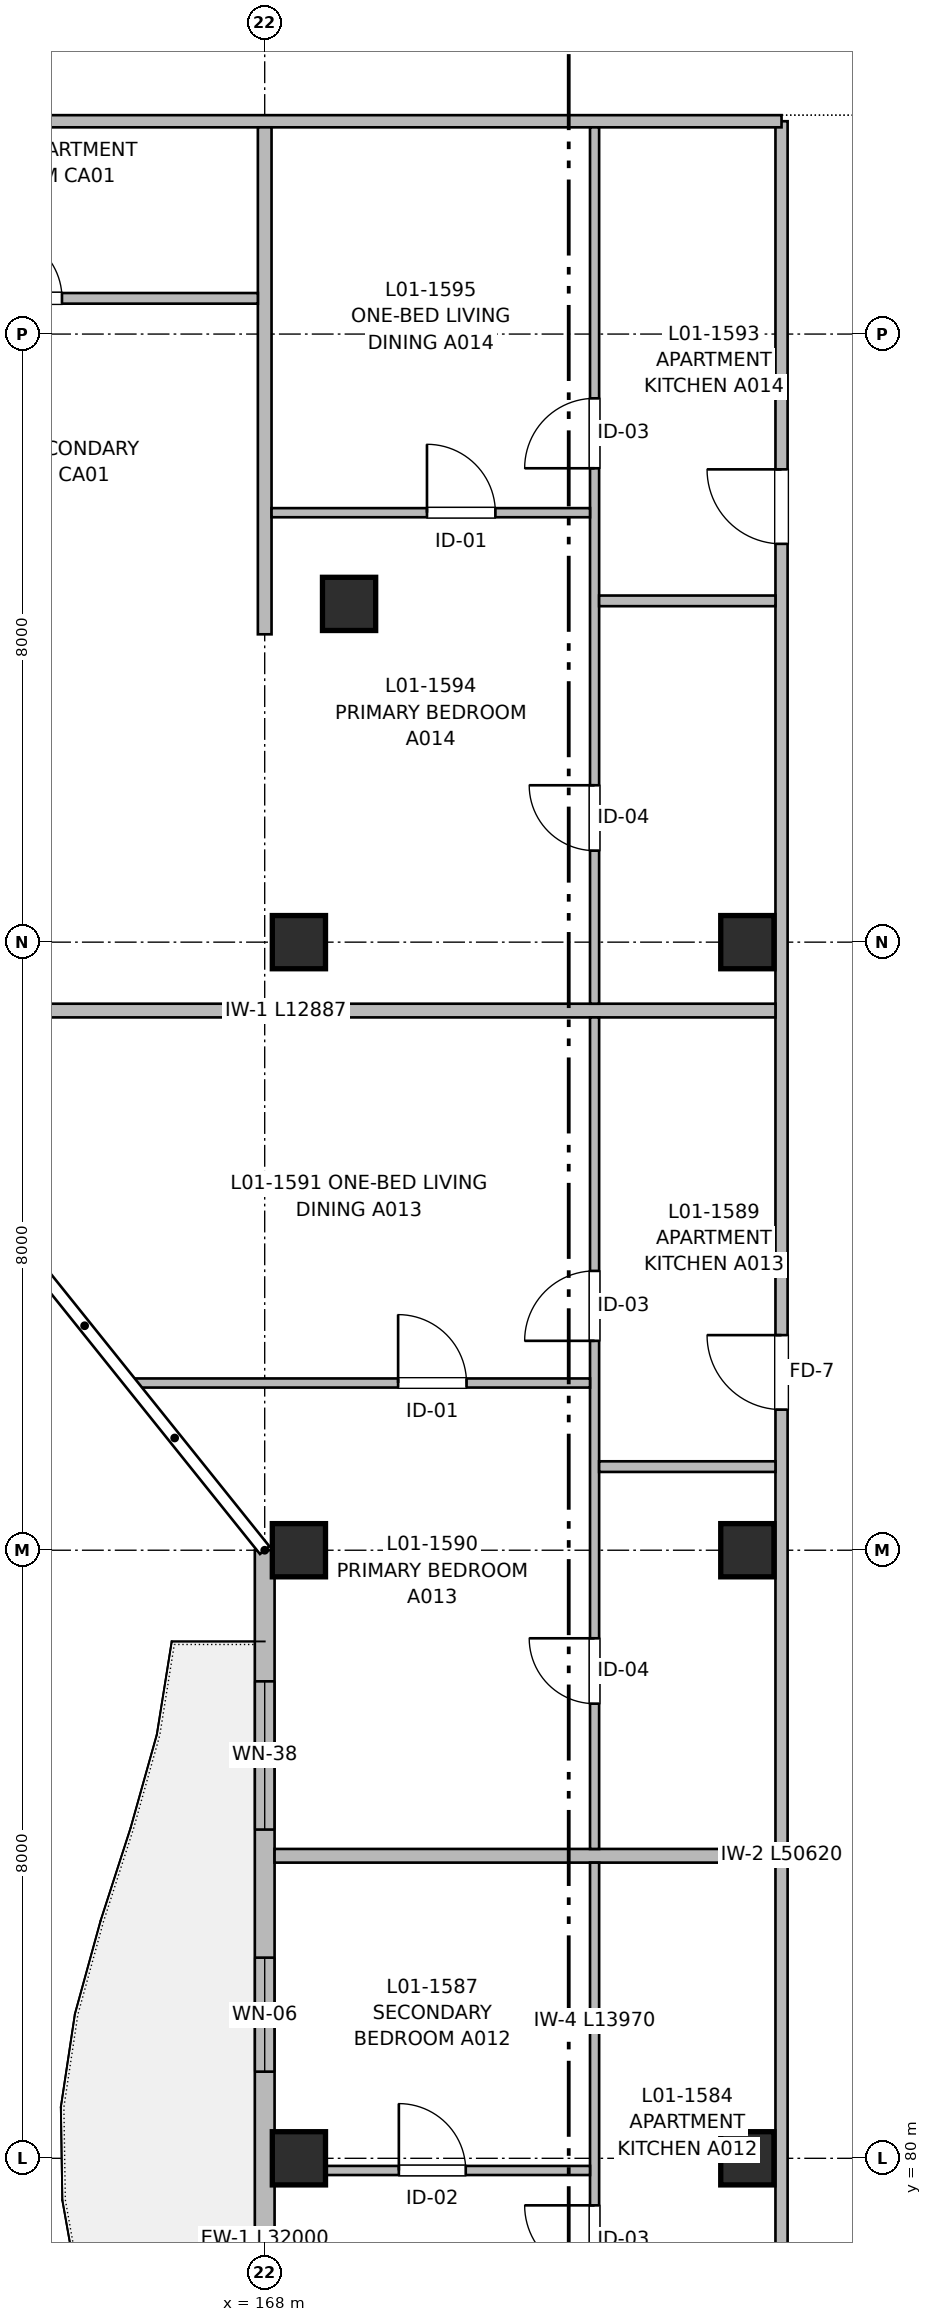
"""IFC4 building model, lengths in metres.
Left out: names, types, materials, properties, quantities, classifications, styles, units other than length and angle.
Written with IfcOpenShell. Run it as: python <this file> out.ifc"""

import sys

from ifc_helpers import new_model, si_unit, direction, frame, frame_2d, origin, origin_2d, place, context, subcontext, project, spatial, rectangle, extrude, element, fill, save


model = new_model("IFC4")
c1 = context("Model", 3, precision=1e-05, world=origin(), true_north=direction((0.0, 1.0)))
c2 = subcontext(c1, "Body", "Model", "MODEL_VIEW")
j1 = project(units=[si_unit("LENGTHUNIT", "METRE"), si_unit("PLANEANGLEUNIT", "RADIAN")], contexts=[c1])
p1 = place(None, origin())
s1 = spatial("IfcSite", under=j1, at=p1, CompositionType="ELEMENT")
p2 = place(p1, origin())
s2 = spatial("IfcBuilding", under=s1, at=p2, CompositionType="ELEMENT")
p3 = place(p2, frame((0.0, 0.0, 4.16)))
s3 = spatial("IfcBuildingStorey", under=s2, at=p3, CompositionType="ELEMENT", Elevation=4.16)
for number, where, z_axis, x_axis in (
    (1, (168.45, 80.0, 0.0), (0.0, 0.0, 1.0), (1.0, 0.0, 0.0)),
    (2, (168.45, 88.0, 0.0), (0.0, 0.0, 1.0), (1.0, 0.0, 0.0)),
    (3, (168.45, 96.0, 0.0), (0.0, 0.0, 1.0), (1.0, 0.0, 0.0)),
    (4, (169.11, 100.45, 0.0), (0.0, 0.0, 1.0), (1.0, 0.0, 0.0)),
    (5, (174.35, 80.0, 0.0), (0.0, 0.0, 1.0), (1.0, 0.0, 0.0)),
    (6, (174.35, 88.0, 0.0), (0.0, 0.0, 1.0), (1.0, 0.0, 0.0)),
    (7, (174.35, 96.0, 0.0), (0.0, 0.0, 1.0), (1.0, 0.0, 0.0)),
):
    element("IfcColumn", number, at=place(p3, frame(where, z_axis=z_axis, x_axis=x_axis)), inside=s3, PredefinedType="COLUMN", context=c2, shape_type="SweptSolid", body=[
        extrude(rectangle(XDim=0.7, YDim=0.7, at=origin_2d()), origin(), (0.0, 0.0, 1.0), 3.2),
    ])
p4 = place(p3, frame((168.0, 56.0, 0.0), z_axis=(0.0, 0.0, 1.0), x_axis=(0.0, 1.0, 0.0)))
e8 = element("IfcWall", 8, at=p4, inside=s3, PredefinedType="SOLIDWALL", context=c2, shape_type="SweptSolid", body=[
    extrude(rectangle(XDim=32.0, YDim=0.26, at=frame_2d((16.0, 0.0))), origin(), (0.0, 0.0, 1.0), 2.98),
])
p5 = place(p4, frame((2.55, 0.0, 0.0)))
e9 = element("IfcOpeningElement", 9, at=p5, cuts=e8, PredefinedType="OPENING", context=c2, shape_type="SweptSolid", body=[
    extrude(rectangle(XDim=1.2, YDim=2.2, at=frame_2d((0.6, 1.1))), frame((0.0, 0.14, 0.0), z_axis=(0.0, -1.0, 0.0), x_axis=(1.0, 0.0, 0.0)), (0.0, 0.0, 1.0), 0.28),
])
p6 = place(p4, frame((5.3, 0.0, 0.72)))
e10 = element("IfcOpeningElement", 10, at=p6, cuts=e8, PredefinedType="OPENING", context=c2, shape_type="SweptSolid", body=[
    extrude(rectangle(XDim=2.0, YDim=1.5, at=frame_2d((1.0, 0.75))), frame((0.0, 0.14, 0.0), z_axis=(0.0, -1.0, 0.0), x_axis=(1.0, 0.0, 0.0)), (0.0, 0.0, 1.0), 0.28),
])
p7 = place(p4, frame((10.85, 0.0, 0.57)))
e11 = element("IfcOpeningElement", 11, at=p7, cuts=e8, PredefinedType="OPENING", context=c2, shape_type="SweptSolid", body=[
    extrude(rectangle(XDim=2.3, YDim=1.65, at=frame_2d((1.15, 0.825))), frame((0.0, 0.14, 0.0), z_axis=(0.0, -1.0, 0.0), x_axis=(1.0, 0.0, 0.0)), (0.0, 0.0, 1.0), 0.28),
])
p8 = place(p4, frame((19.275, 0.0, 0.77)))
e12 = element("IfcOpeningElement", 12, at=p8, cuts=e8, PredefinedType="OPENING", context=c2, shape_type="SweptSolid", body=[
    extrude(rectangle(XDim=1.45, YDim=1.45, at=frame_2d((0.725, 0.725))), frame((0.0, 0.14, 0.0), z_axis=(0.0, -1.0, 0.0), x_axis=(1.0, 0.0, 0.0)), (0.0, 0.0, 1.0), 0.28),
])
p9 = place(p4, frame((28.325, 0.0, 0.72)))
e13 = element("IfcOpeningElement", 13, at=p9, cuts=e8, PredefinedType="OPENING", context=c2, shape_type="SweptSolid", body=[
    extrude(rectangle(XDim=1.95, YDim=1.5, at=frame_2d((0.975, 0.75))), frame((0.0, 0.14, 0.0), z_axis=(0.0, -1.0, 0.0), x_axis=(1.0, 0.0, 0.0)), (0.0, 0.0, 1.0), 0.28),
])
p10 = place(p4, frame((16.479, 0.0, 0.82)))
e14 = element("IfcOpeningElement", 14, at=p10, cuts=e8, PredefinedType="OPENING", context=c2, shape_type="SweptSolid", body=[
    extrude(rectangle(XDim=1.5, YDim=1.4, at=frame_2d((0.75, 0.7))), frame((0.0, 0.14, 0.0), z_axis=(0.0, -1.0, 0.0), x_axis=(1.0, 0.0, 0.0)), (0.0, 0.0, 1.0), 0.28),
])
p11 = place(p4, frame((25.14, 0.0, 0.82)))
e15 = element("IfcOpeningElement", 15, at=p11, cuts=e8, PredefinedType="OPENING", context=c2, shape_type="SweptSolid", body=[
    extrude(rectangle(XDim=1.5, YDim=1.4, at=frame_2d((0.75, 0.7))), frame((0.0, 0.14, 0.0), z_axis=(0.0, -1.0, 0.0), x_axis=(1.0, 0.0, 0.0)), (0.0, 0.0, 1.0), 0.28),
])
p12 = place(p3, frame((174.8, 56.18, 0.0), z_axis=(0.0, 0.0, 1.0), x_axis=(0.0, 1.0, 0.0)))
e16 = element("IfcWall", 16, at=p12, inside=s3, PredefinedType="PARTITIONING", context=c2, shape_type="SweptSolid", body=[
    extrude(rectangle(XDim=50.62, YDim=0.16, at=frame_2d((25.31, 0.0))), origin(), (0.0, 0.0, 1.0), 2.935),
])
p13 = place(p12, frame((8.79, 0.0, 0.0)))
e17 = element("IfcOpeningElement", 17, at=p13, cuts=e16, PredefinedType="OPENING", context=c2, shape_type="SweptSolid", body=[
    extrude(rectangle(XDim=0.98, YDim=2.15, at=frame_2d((0.49, 1.075))), frame((0.0, 0.09, 0.0), z_axis=(0.0, -1.0, 0.0), x_axis=(1.0, 0.0, 0.0)), (0.0, 0.0, 1.0), 0.18),
])
p14 = place(p12, frame((20.92, 0.0, 0.0)))
e18 = element("IfcOpeningElement", 18, at=p14, cuts=e16, PredefinedType="OPENING", context=c2, shape_type="SweptSolid", body=[
    extrude(rectangle(XDim=1.02, YDim=2.15, at=frame_2d((0.51, 1.075))), frame((0.0, 0.09, 0.0), z_axis=(0.0, -1.0, 0.0), x_axis=(1.0, 0.0, 0.0)), (0.0, 0.0, 1.0), 0.18),
])
p15 = place(p12, frame((33.67, 0.0, 0.0)))
e19 = element("IfcOpeningElement", 19, at=p15, cuts=e16, PredefinedType="OPENING", context=c2, shape_type="SweptSolid", body=[
    extrude(rectangle(XDim=0.98, YDim=2.15, at=frame_2d((0.49, 1.075))), frame((0.0, 0.09, 0.0), z_axis=(0.0, -1.0, 0.0), x_axis=(1.0, 0.0, 0.0)), (0.0, 0.0, 1.0), 0.18),
])
p16 = place(p12, frame((45.06, 0.0, 0.0)))
e20 = element("IfcOpeningElement", 20, at=p16, cuts=e16, PredefinedType="OPENING", context=c2, shape_type="SweptSolid", body=[
    extrude(rectangle(XDim=0.98, YDim=2.15, at=frame_2d((0.49, 1.075))), frame((0.0, 0.09, 0.0), z_axis=(0.0, -1.0, 0.0), x_axis=(1.0, 0.0, 0.0)), (0.0, 0.0, 1.0), 0.18),
])
p17 = place(p3, frame((147.18, 106.8, 0.0), z_axis=(0.0, 0.0, 1.0), x_axis=(1.0, 0.0, 0.0)))
e21 = element("IfcWall", 21, at=p17, inside=s3, PredefinedType="PARTITIONING", context=c2, shape_type="SweptSolid", body=[
    extrude(rectangle(XDim=27.62, YDim=0.16, at=frame_2d((13.81, 0.0))), origin(), (0.0, 0.0, 1.0), 2.935),
])
p18 = place(p17, frame((3.495, 0.0, 0.0)))
e22 = element("IfcOpeningElement", 22, at=p18, cuts=e21, PredefinedType="OPENING", context=c2, shape_type="SweptSolid", body=[
    extrude(rectangle(XDim=1.05, YDim=2.15, at=frame_2d((0.525, 1.075))), frame((0.0, 0.09, 0.0), z_axis=(0.0, -1.0, 0.0), x_axis=(1.0, 0.0, 0.0)), (0.0, 0.0, 1.0), 0.18),
])
p19 = place(p17, frame((10.67, 0.0, 0.0)))
e23 = element("IfcOpeningElement", 23, at=p19, cuts=e21, PredefinedType="OPENING", context=c2, shape_type="SweptSolid", body=[
    extrude(rectangle(XDim=0.98, YDim=2.15, at=frame_2d((0.49, 1.075))), frame((0.0, 0.09, 0.0), z_axis=(0.0, -1.0, 0.0), x_axis=(1.0, 0.0, 0.0)), (0.0, 0.0, 1.0), 0.18),
])
p20 = place(p3, frame((168.0, 100.05, 0.0), z_axis=(0.0, 0.0, 1.0), x_axis=(0.0, 1.0, 0.0)))
e24 = element("IfcWall", 24, at=p20, inside=s3, PredefinedType="PARTITIONING", context=c2, shape_type="SweptSolid", body=[
    extrude(rectangle(XDim=6.67, YDim=0.18, at=frame_2d((3.335, 0.0))), origin(), (0.0, 0.0, 1.0), 2.935),
])
p21 = place(p3, frame((168.13, 83.98, 0.0), z_axis=(0.0, 0.0, 1.0), x_axis=(1.0, 0.0, 0.0)))
e25 = element("IfcWall", 25, at=p21, inside=s3, PredefinedType="PARTITIONING", context=c2, shape_type="SweptSolid", body=[
    extrude(rectangle(XDim=6.59, YDim=0.18, at=frame_2d((3.295, 0.0))), origin(), (0.0, 0.0, 1.0), 2.935),
])
p22 = place(p3, frame((161.833, 95.1, 0.0), z_axis=(0.0, 0.0, 1.0), x_axis=(1.0, 0.0, 0.0)))
e26 = element("IfcWall", 26, at=p22, inside=s3, PredefinedType="PARTITIONING", context=c2, shape_type="SweptSolid", body=[
    extrude(rectangle(XDim=12.887, YDim=0.18, at=frame_2d((6.444, 0.0))), origin(), (0.0, 0.0, 1.0), 2.935),
])
p23 = place(p3, frame((172.34, 69.92, 0.0), z_axis=(0.0, 0.0, 1.0), x_axis=(0.0, 1.0, 0.0)))
e27 = element("IfcWall", 27, at=p23, inside=s3, PredefinedType="PARTITIONING", context=c2, shape_type="SweptSolid", body=[
    extrude(rectangle(XDim=13.97, YDim=0.12, at=frame_2d((6.985, 0.0))), origin(), (0.0, 0.0, 1.0), 2.935),
])
p24 = place(p23, frame((2.443, 0.0, 0.0)))
e28 = element("IfcOpeningElement", 28, at=p24, cuts=e27, PredefinedType="OPENING", context=c2, shape_type="SweptSolid", body=[
    extrude(rectangle(XDim=0.94, YDim=2.1, at=frame_2d((0.47, 1.05))), frame((0.0, 0.07, 0.0), z_axis=(0.0, -1.0, 0.0), x_axis=(1.0, 0.0, 0.0)), (0.0, 0.0, 1.0), 0.14),
])
p25 = place(p23, frame((8.541, 0.0, 0.0)))
e29 = element("IfcOpeningElement", 29, at=p25, cuts=e27, PredefinedType="OPENING", context=c2, shape_type="SweptSolid", body=[
    extrude(rectangle(XDim=0.92, YDim=2.1, at=frame_2d((0.46, 1.05))), frame((0.0, 0.07, 0.0), z_axis=(0.0, -1.0, 0.0), x_axis=(1.0, 0.0, 0.0)), (0.0, 0.0, 1.0), 0.14),
])
p26 = place(p3, frame((168.13, 79.84, 0.0), z_axis=(0.0, 0.0, 1.0), x_axis=(1.0, 0.0, 0.0)))
e30 = element("IfcWall", 30, at=p26, inside=s3, PredefinedType="PARTITIONING", context=c2, shape_type="SweptSolid", body=[
    extrude(rectangle(XDim=4.15, YDim=0.12, at=frame_2d((2.075, 0.0))), origin(), (0.0, 0.0, 1.0), 2.53),
])
p27 = place(p26, frame((1.635, 0.0, 0.0)))
e31 = element("IfcOpeningElement", 31, at=p27, cuts=e30, PredefinedType="OPENING", context=c2, shape_type="SweptSolid", body=[
    extrude(rectangle(XDim=0.88, YDim=2.1, at=frame_2d((0.44, 1.05))), frame((0.0, 0.07, 0.0), z_axis=(0.0, -1.0, 0.0), x_axis=(1.0, 0.0, 0.0)), (0.0, 0.0, 1.0), 0.14),
])
p28 = place(p3, frame((172.34, 84.07, 0.0), z_axis=(0.0, 0.0, 1.0), x_axis=(0.0, 1.0, 0.0)))
e32 = element("IfcWall", 32, at=p28, inside=s3, PredefinedType="PARTITIONING", context=c2, shape_type="SweptSolid", body=[
    extrude(rectangle(XDim=10.94, YDim=0.12, at=frame_2d((5.47, 0.0))), origin(), (0.0, 0.0, 1.0), 2.935),
])
p29 = place(p28, frame((1.911, 0.0, 0.0)))
e33 = element("IfcOpeningElement", 33, at=p29, cuts=e32, PredefinedType="OPENING", context=c2, shape_type="SweptSolid", body=[
    extrude(rectangle(XDim=0.86, YDim=2.1, at=frame_2d((0.43, 1.05))), frame((0.0, 0.07, 0.0), z_axis=(0.0, -1.0, 0.0), x_axis=(1.0, 0.0, 0.0)), (0.0, 0.0, 1.0), 0.14),
])
p30 = place(p28, frame((6.685, 0.0, 0.0)))
e34 = element("IfcOpeningElement", 34, at=p30, cuts=e32, PredefinedType="OPENING", context=c2, shape_type="SweptSolid", body=[
    extrude(rectangle(XDim=0.92, YDim=2.1, at=frame_2d((0.46, 1.05))), frame((0.0, 0.07, 0.0), z_axis=(0.0, -1.0, 0.0), x_axis=(1.0, 0.0, 0.0)), (0.0, 0.0, 1.0), 0.14),
])
p31 = place(p3, frame((172.4, 89.1, 0.0), z_axis=(0.0, 0.0, 1.0), x_axis=(1.0, 0.0, 0.0)))
e35 = element("IfcWall", 35, at=p31, inside=s3, PredefinedType="PARTITIONING", context=c2, shape_type="SweptSolid", body=[
    extrude(rectangle(XDim=2.32, YDim=0.14, at=frame_2d((1.16, 0.0))), origin(), (0.0, 0.0, 1.0), 2.935),
])
p32 = place(p3, frame((166.286, 90.2, 0.0), z_axis=(0.0, 0.0, 1.0), x_axis=(1.0, 0.0, 0.0)))
e36 = element("IfcWall", 36, at=p32, inside=s3, PredefinedType="PARTITIONING", context=c2, shape_type="SweptSolid", body=[
    extrude(rectangle(XDim=5.994, YDim=0.12, at=frame_2d((2.997, 0.0))), origin(), (0.0, 0.0, 1.0), 2.935),
])
p33 = place(p32, frame((3.469, 0.0, 0.0)))
e37 = element("IfcOpeningElement", 37, at=p33, cuts=e36, PredefinedType="OPENING", context=c2, shape_type="SweptSolid", body=[
    extrude(rectangle(XDim=0.9, YDim=2.1, at=frame_2d((0.45, 1.05))), frame((0.0, 0.07, 0.0), z_axis=(0.0, -1.0, 0.0), x_axis=(1.0, 0.0, 0.0)), (0.0, 0.0, 1.0), 0.14),
])
p34 = place(p3, frame((172.34, 95.19, 0.0), z_axis=(0.0, 0.0, 1.0), x_axis=(0.0, 1.0, 0.0)))
e38 = element("IfcWall", 38, at=p34, inside=s3, PredefinedType="PARTITIONING", context=c2, shape_type="SweptSolid", body=[
    extrude(rectangle(XDim=11.53, YDim=0.12, at=frame_2d((5.765, 0.0))), origin(), (0.0, 0.0, 1.0), 2.935),
])
p35 = place(p34, frame((2.014, 0.0, 0.0)))
e39 = element("IfcOpeningElement", 39, at=p35, cuts=e38, PredefinedType="OPENING", context=c2, shape_type="SweptSolid", body=[
    extrude(rectangle(XDim=0.86, YDim=2.1, at=frame_2d((0.43, 1.05))), frame((0.0, 0.07, 0.0), z_axis=(0.0, -1.0, 0.0), x_axis=(1.0, 0.0, 0.0)), (0.0, 0.0, 1.0), 0.14),
])
p36 = place(p34, frame((7.044, 0.0, 0.0)))
e40 = element("IfcOpeningElement", 40, at=p36, cuts=e38, PredefinedType="OPENING", context=c2, shape_type="SweptSolid", body=[
    extrude(rectangle(XDim=0.92, YDim=2.1, at=frame_2d((0.46, 1.05))), frame((0.0, 0.07, 0.0), z_axis=(0.0, -1.0, 0.0), x_axis=(1.0, 0.0, 0.0)), (0.0, 0.0, 1.0), 0.14),
])
p37 = place(p3, frame((172.4, 100.49, 0.0), z_axis=(0.0, 0.0, 1.0), x_axis=(1.0, 0.0, 0.0)))
e41 = element("IfcWall", 41, at=p37, inside=s3, PredefinedType="PARTITIONING", context=c2, shape_type="SweptSolid", body=[
    extrude(rectangle(XDim=2.32, YDim=0.14, at=frame_2d((1.16, 0.0))), origin(), (0.0, 0.0, 1.0), 2.73),
])
p38 = place(p3, frame((168.09, 101.65, 0.0), z_axis=(0.0, 0.0, 1.0), x_axis=(1.0, 0.0, 0.0)))
e42 = element("IfcWall", 42, at=p38, inside=s3, PredefinedType="PARTITIONING", context=c2, shape_type="SweptSolid", body=[
    extrude(rectangle(XDim=4.19, YDim=0.12, at=frame_2d((2.095, 0.0))), origin(), (0.0, 0.0, 1.0), 2.935),
])
p39 = place(p38, frame((2.045, 0.0, 0.0)))
e43 = element("IfcOpeningElement", 43, at=p39, cuts=e42, PredefinedType="OPENING", context=c2, shape_type="SweptSolid", body=[
    extrude(rectangle(XDim=0.9, YDim=2.1, at=frame_2d((0.45, 1.05))), frame((0.0, 0.07, 0.0), z_axis=(0.0, -1.0, 0.0), x_axis=(1.0, 0.0, 0.0)), (0.0, 0.0, 1.0), 0.14),
])
p40 = place(p3, frame((161.94, 104.47, 0.0), z_axis=(0.0, 0.0, 1.0), x_axis=(1.0, 0.0, 0.0)))
e44 = element("IfcWall", 44, at=p40, inside=s3, PredefinedType="PARTITIONING", context=c2, shape_type="SweptSolid", body=[
    extrude(rectangle(XDim=5.97, YDim=0.14, at=frame_2d((2.985, 0.0))), origin(), (0.0, 0.0, 1.0), 2.935),
])
p41 = place(p40, frame((2.533, 0.0, 0.0)))
e45 = element("IfcOpeningElement", 45, at=p41, cuts=e44, PredefinedType="OPENING", context=c2, shape_type="SweptSolid", body=[
    extrude(rectangle(XDim=0.86, YDim=2.1, at=frame_2d((0.43, 1.05))), frame((0.0, 0.08, 0.0), z_axis=(0.0, -1.0, 0.0), x_axis=(1.0, 0.0, 0.0)), (0.0, 0.0, 1.0), 0.16),
])
p42 = place(p9, origin())
e46 = element("IfcWindow", 46, at=p42, inside=s3, PartitioningType="SINGLE_PANEL", PredefinedType="WINDOW", context=c2, shape_type="SweptSolid", body=[
    extrude(rectangle(XDim=1.95, YDim=1.5, at=frame_2d((0.975, 0.75))), frame((0.0, 0.03, 0.0), z_axis=(0.0, -1.0, 0.0), x_axis=(1.0, 0.0, 0.0)), (0.0, 0.0, 1.0), 0.06),
])
fill(e13, e46)
p43 = place(p25, origin())
e47 = element("IfcDoor", 47, at=p43, inside=s3, OperationType="SINGLE_SWING_RIGHT", PredefinedType="DOOR", context=c2, shape_type="SweptSolid", body=[
    extrude(rectangle(XDim=0.92, YDim=2.1, at=frame_2d((0.46, 1.05))), frame((0.0, 0.025, 0.0), z_axis=(0.0, -1.0, 0.0), x_axis=(1.0, 0.0, 0.0)), (0.0, 0.0, 1.0), 0.05),
])
fill(e29, e47)
p44 = place(p27, origin())
e48 = element("IfcDoor", 48, at=p44, inside=s3, OperationType="SINGLE_SWING_LEFT", PredefinedType="DOOR", context=c2, shape_type="SweptSolid", body=[
    extrude(rectangle(XDim=0.88, YDim=2.1, at=frame_2d((0.44, 1.05))), frame((0.0, 0.025, 0.0), z_axis=(0.0, -1.0, 0.0), x_axis=(1.0, 0.0, 0.0)), (0.0, 0.0, 1.0), 0.05),
])
fill(e31, e48)
p45 = place(p29, origin())
e49 = element("IfcDoor", 49, at=p45, inside=s3, OperationType="SINGLE_SWING_RIGHT", PredefinedType="DOOR", context=c2, shape_type="SweptSolid", body=[
    extrude(rectangle(XDim=0.86, YDim=2.1, at=frame_2d((0.43, 1.05))), frame((0.0, 0.025, 0.0), z_axis=(0.0, -1.0, 0.0), x_axis=(1.0, 0.0, 0.0)), (0.0, 0.0, 1.0), 0.05),
])
fill(e33, e49)
p46 = place(p30, origin())
e50 = element("IfcDoor", 50, at=p46, inside=s3, OperationType="SINGLE_SWING_LEFT", PredefinedType="DOOR", context=c2, shape_type="SweptSolid", body=[
    extrude(rectangle(XDim=0.92, YDim=2.1, at=frame_2d((0.46, 1.05))), frame((0.0, 0.025, 0.0), z_axis=(0.0, -1.0, 0.0), x_axis=(1.0, 0.0, 0.0)), (0.0, 0.0, 1.0), 0.05),
])
fill(e34, e50)
p47 = place(p15, origin())
e51 = element("IfcDoor", 51, at=p47, inside=s3, OperationType="SINGLE_SWING_RIGHT", PredefinedType="DOOR", context=c2, shape_type="SweptSolid", body=[
    extrude(rectangle(XDim=0.98, YDim=2.15, at=frame_2d((0.49, 1.075))), frame((0.0, 0.025, 0.0), z_axis=(0.0, -1.0, 0.0), x_axis=(1.0, 0.0, 0.0)), (0.0, 0.0, 1.0), 0.05),
])
fill(e19, e51)
p48 = place(p33, origin())
e52 = element("IfcDoor", 52, at=p48, inside=s3, OperationType="SINGLE_SWING_LEFT", PredefinedType="DOOR", context=c2, shape_type="SweptSolid", body=[
    extrude(rectangle(XDim=0.9, YDim=2.1, at=frame_2d((0.45, 1.05))), frame((0.0, 0.025, 0.0), z_axis=(0.0, -1.0, 0.0), x_axis=(1.0, 0.0, 0.0)), (0.0, 0.0, 1.0), 0.05),
])
fill(e37, e52)
p49 = place(p35, origin())
e53 = element("IfcDoor", 53, at=p49, inside=s3, OperationType="SINGLE_SWING_RIGHT", PredefinedType="DOOR", context=c2, shape_type="SweptSolid", body=[
    extrude(rectangle(XDim=0.86, YDim=2.1, at=frame_2d((0.43, 1.05))), frame((0.0, 0.025, 0.0), z_axis=(0.0, -1.0, 0.0), x_axis=(1.0, 0.0, 0.0)), (0.0, 0.0, 1.0), 0.05),
])
fill(e39, e53)
p50 = place(p36, origin())
e54 = element("IfcDoor", 54, at=p50, inside=s3, OperationType="SINGLE_SWING_LEFT", PredefinedType="DOOR", context=c2, shape_type="SweptSolid", body=[
    extrude(rectangle(XDim=0.92, YDim=2.1, at=frame_2d((0.46, 1.05))), frame((0.0, 0.025, 0.0), z_axis=(0.0, -1.0, 0.0), x_axis=(1.0, 0.0, 0.0)), (0.0, 0.0, 1.0), 0.05),
])
fill(e40, e54)
p51 = place(p16, origin())
e55 = element("IfcDoor", 55, at=p51, inside=s3, OperationType="SINGLE_SWING_RIGHT", PredefinedType="DOOR", context=c2, shape_type="SweptSolid", body=[
    extrude(rectangle(XDim=0.98, YDim=2.15, at=frame_2d((0.49, 1.075))), frame((0.0, 0.025, 0.0), z_axis=(0.0, -1.0, 0.0), x_axis=(1.0, 0.0, 0.0)), (0.0, 0.0, 1.0), 0.05),
])
fill(e20, e55)
p52 = place(p39, origin())
e56 = element("IfcDoor", 56, at=p52, inside=s3, OperationType="SINGLE_SWING_LEFT", PredefinedType="DOOR", context=c2, shape_type="SweptSolid", body=[
    extrude(rectangle(XDim=0.9, YDim=2.1, at=frame_2d((0.45, 1.05))), frame((0.0, 0.025, 0.0), z_axis=(0.0, -1.0, 0.0), x_axis=(1.0, 0.0, 0.0)), (0.0, 0.0, 1.0), 0.05),
])
fill(e43, e56)
p53 = place(p41, origin())
e57 = element("IfcDoor", 57, at=p53, inside=s3, OperationType="SINGLE_SWING_LEFT", PredefinedType="DOOR", context=c2, shape_type="SweptSolid", body=[
    extrude(rectangle(XDim=0.86, YDim=2.1, at=frame_2d((0.43, 1.05))), frame((0.0, 0.025, 0.0), z_axis=(0.0, -1.0, 0.0), x_axis=(1.0, 0.0, 0.0)), (0.0, 0.0, 1.0), 0.05),
])
fill(e45, e57)
p54 = place(p11, origin())
e58 = element("IfcWindow", 58, at=p54, inside=s3, PartitioningType="SINGLE_PANEL", PredefinedType="WINDOW", context=c2, shape_type="SweptSolid", body=[
    extrude(rectangle(XDim=1.5, YDim=1.4, at=frame_2d((0.75, 0.7))), frame((0.0, 0.03, 0.0), z_axis=(0.0, -1.0, 0.0), x_axis=(1.0, 0.0, 0.0)), (0.0, 0.0, 1.0), 0.06),
])
fill(e15, e58)
save(model, sys.argv[1])
